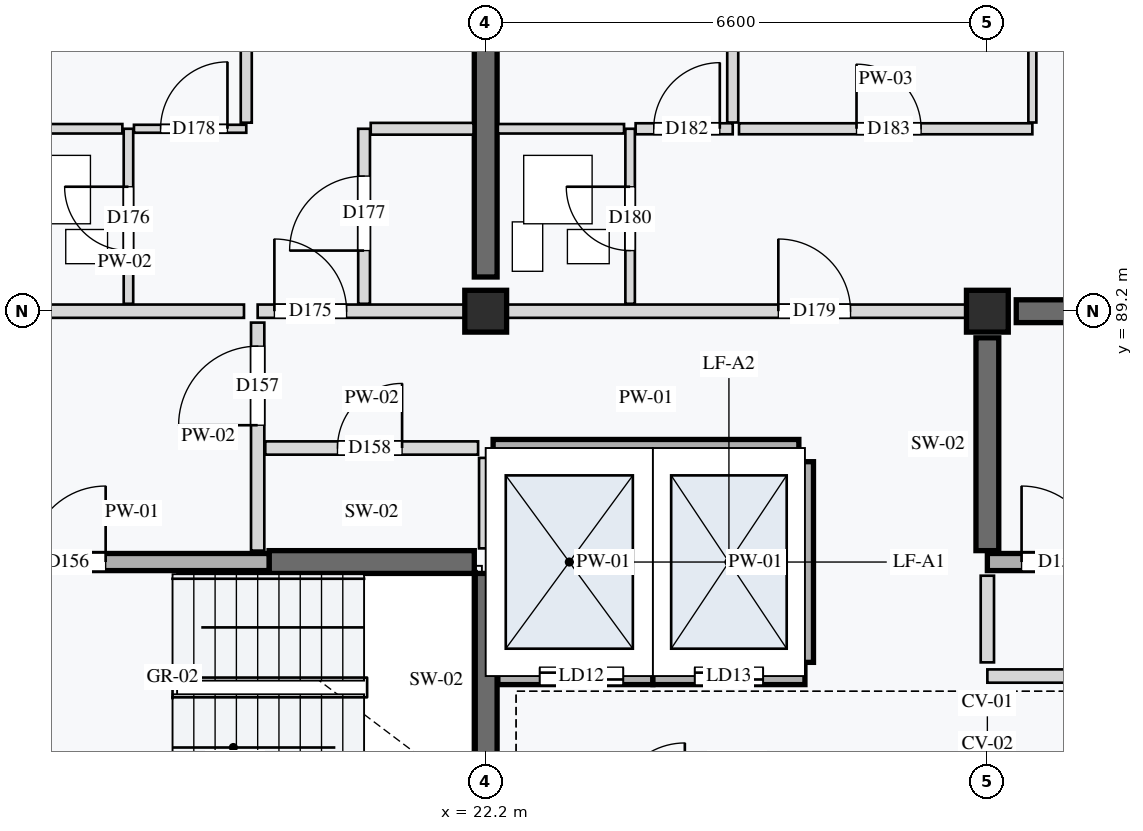
"""IFC4 building model, lengths in metres.
Left out: names, types, materials, properties, quantities, classifications, styles, units other than length and angle.
Written with IfcOpenShell. Run it as: python <this file> out.ifc"""

import sys

from ifc_helpers import new_model, si_unit, direction, frame, frame_2d, origin, origin_2d, place, context, subcontext, project, spatial, rectangle, extrude, element, fill, save


model = new_model("IFC4")
c1 = context("Model", 3, precision=1e-05, world=origin(), true_north=direction((0.0, 1.0)))
c2 = subcontext(c1, "Body", "Model", "MODEL_VIEW")
j1 = project(units=[si_unit("LENGTHUNIT", "METRE"), si_unit("PLANEANGLEUNIT", "RADIAN")], contexts=[c1])
p1 = place(None, origin())
s1 = spatial("IfcSite", under=j1, at=p1, CompositionType="ELEMENT")
p2 = place(p1, origin())
s2 = spatial("IfcBuilding", under=s1, at=p2, CompositionType="ELEMENT")
p3 = place(p2, frame((0.0, 0.0, 18.0)))
s3 = spatial("IfcBuildingStorey", under=s2, at=p3, CompositionType="ELEMENT", Elevation=18.0)
for number, where, z_axis, x_axis in (
    (1, (22.2, 89.2, 0.0), (0.0, 0.0, 1.0), (1.0, 0.0, 0.0)),
    (2, (28.8, 89.2, 0.0), (0.0, 0.0, 1.0), (1.0, 0.0, 0.0)),
):
    element("IfcColumn", number, at=place(p3, frame(where, z_axis=z_axis, x_axis=x_axis)), inside=s3, PredefinedType="COLUMN", context=c2, shape_type="SweptSolid", body=[
        extrude(rectangle(XDim=0.55, YDim=0.55, at=origin_2d()), origin(), (0.0, 0.0, 1.0), 3.2),
    ])
p4 = place(p3, frame((19.35, 85.9, 0.0), z_axis=(0.0, 0.0, 1.0), x_axis=(1.0, 0.0, 0.0)))
e3 = element("IfcWall", 3, at=p4, inside=s3, PredefinedType="SHEAR", context=c2, shape_type="SweptSolid", body=[
    extrude(rectangle(XDim=2.7, YDim=0.3, at=frame_2d((1.35, 0.0))), origin(), (0.0, 0.0, 1.0), 2.96),
])
p5 = place(p3, frame((22.2, 82.95, 0.0), z_axis=(0.0, 0.0, 1.0), x_axis=(0.0, 1.0, 0.0)))
e4 = element("IfcWall", 4, at=p5, inside=s3, PredefinedType="SHEAR", context=c2, shape_type="SweptSolid", body=[
    extrude(rectangle(XDim=2.8, YDim=0.3, at=frame_2d((1.4, 0.0))), origin(), (0.0, 0.0, 1.0), 2.96),
])
p6 = place(p3, frame((29.18, 89.2, 0.0), z_axis=(0.0, 0.0, 1.0), x_axis=(1.0, 0.0, 0.0)))
e5 = element("IfcWall", 5, at=p6, inside=s3, PredefinedType="SHEAR", context=c2, shape_type="SweptSolid", body=[
    extrude(rectangle(XDim=5.84, YDim=0.3, at=frame_2d((2.92, 0.0))), origin(), (0.0, 0.0, 1.0), 2.96),
])
p7 = place(p3, frame((28.8, 86.05, 0.0), z_axis=(0.0, 0.0, 1.0), x_axis=(0.0, 1.0, 0.0)))
e6 = element("IfcWall", 6, at=p7, inside=s3, PredefinedType="SHEAR", context=c2, shape_type="SweptSolid", body=[
    extrude(rectangle(XDim=2.8, YDim=0.3, at=frame_2d((1.4, 0.0))), origin(), (0.0, 0.0, 1.0), 2.96),
])
p8 = place(p3, frame((22.2, 89.65, 0.0), z_axis=(0.0, 0.0, 1.0), x_axis=(0.0, 1.0, 0.0)))
e7 = element("IfcWall", 7, at=p8, inside=s3, PredefinedType="SHEAR", context=c2, shape_type="SweptSolid", body=[
    extrude(rectangle(XDim=5.7, YDim=0.3, at=frame_2d((2.85, 0.0))), origin(), (0.0, 0.0, 1.0), 2.96),
])
p9 = place(p3, frame((15.75, 85.9, 0.0), z_axis=(0.0, 0.0, 1.0), x_axis=(1.0, 0.0, 0.0)))
e8 = element("IfcWall", 8, at=p9, inside=s3, PredefinedType="STANDARD", context=c2, shape_type="SweptSolid", body=[
    extrude(rectangle(XDim=3.6, YDim=0.225, at=frame_2d((1.8, 0.0))), origin(), (0.0, 0.0, 1.0), 2.96),
])
p10 = place(p9, frame((0.45, 0.0, 0.0)))
e9 = element("IfcOpeningElement", 9, at=p10, cuts=e8, PredefinedType="OPENING", context=c2, shape_type="SweptSolid", body=[
    extrude(rectangle(XDim=1.0, YDim=2.16, at=frame_2d((0.5, 1.08))), frame((0.0, 0.123, 0.0), z_axis=(0.0, -1.0, 0.0), x_axis=(1.0, 0.0, 0.0)), (0.0, 0.0, 1.0), 0.245),
])
p11 = place(p3, frame((19.2, 86.05, 0.0), z_axis=(0.0, 0.0, 1.0), x_axis=(0.0, 1.0, 0.0)))
e10 = element("IfcWall", 10, at=p11, inside=s3, PredefinedType="PARTITIONING", context=c2, shape_type="SweptSolid", body=[
    extrude(rectangle(XDim=3.0, YDim=0.175, at=frame_2d((1.5, 0.0))), origin(), (0.0, 0.0, 1.0), 2.96),
])
p12 = place(p11, frame((1.65, 0.0, 0.0)))
e11 = element("IfcOpeningElement", 11, at=p12, cuts=e10, PredefinedType="OPENING", context=c2, shape_type="SweptSolid", body=[
    extrude(rectangle(XDim=1.04, YDim=2.12, at=frame_2d((0.52, 1.06))), frame((0.0, 0.097, 0.0), z_axis=(0.0, -1.0, 0.0), x_axis=(1.0, 0.0, 0.0)), (0.0, 0.0, 1.0), 0.195),
])
p13 = place(p3, frame((19.3, 87.4, 0.0), z_axis=(0.0, 0.0, 1.0), x_axis=(1.0, 0.0, 0.0)))
e12 = element("IfcWall", 12, at=p13, inside=s3, PredefinedType="PARTITIONING", context=c2, shape_type="SweptSolid", body=[
    extrude(rectangle(XDim=2.8, YDim=0.175, at=frame_2d((1.4, 0.0))), origin(), (0.0, 0.0, 1.0), 2.96),
])
p14 = place(p13, frame((0.95, 0.0, 0.0)))
e13 = element("IfcOpeningElement", 13, at=p14, cuts=e12, PredefinedType="OPENING", context=c2, shape_type="SweptSolid", body=[
    extrude(rectangle(XDim=0.85, YDim=2.0, at=frame_2d((0.425, 1.0))), frame((0.0, 0.097, 0.0), z_axis=(0.0, -1.0, 0.0), x_axis=(1.0, 0.0, 0.0)), (0.0, 0.0, 1.0), 0.195),
])
p15 = place(p3, frame((22.2, 86.08, 0.0), z_axis=(0.0, 0.0, 1.0), x_axis=(0.0, 1.0, 0.0)))
e14 = element("IfcWall", 14, at=p15, inside=s3, PredefinedType="PARTITIONING", context=c2, shape_type="SweptSolid", body=[
    extrude(rectangle(XDim=1.19, YDim=0.175, at=frame_2d((0.595, 0.0))), origin(), (0.0, 0.0, 1.0), 2.96),
])
p16 = place(p3, frame((22.36, 84.4, 0.0), z_axis=(0.0, 0.0, 1.0), x_axis=(1.0, 0.0, 0.0)))
e15 = element("IfcWall", 15, at=p16, inside=s3, PredefinedType="STANDARD", context=c2, shape_type="SweptSolid", body=[
    extrude(rectangle(XDim=2.04, YDim=0.225, at=frame_2d((1.02, 0.0))), origin(), (0.0, 0.0, 1.0), 2.96),
])
p17 = place(p16, frame((0.55, 0.0, 0.0)))
e16 = element("IfcOpeningElement", 16, at=p17, cuts=e15, PredefinedType="OPENING", context=c2, shape_type="SweptSolid", body=[
    extrude(rectangle(XDim=1.1, YDim=2.1, at=frame_2d((0.55, 1.05))), frame((0.0, 0.123, 0.0), z_axis=(0.0, -1.0, 0.0), x_axis=(1.0, 0.0, 0.0)), (0.0, 0.0, 1.0), 0.245),
])
p18 = place(p3, frame((24.4, 84.4, 0.0), z_axis=(0.0, 0.0, 1.0), x_axis=(1.0, 0.0, 0.0)))
e17 = element("IfcWall", 17, at=p18, inside=s3, PredefinedType="STANDARD", context=c2, shape_type="SweptSolid", body=[
    extrude(rectangle(XDim=2.0, YDim=0.225, at=frame_2d((1.0, 0.0))), origin(), (0.0, 0.0, 1.0), 2.96),
])
p19 = place(p18, frame((0.55, 0.0, 0.0)))
e18 = element("IfcOpeningElement", 18, at=p19, cuts=e17, PredefinedType="OPENING", context=c2, shape_type="SweptSolid", body=[
    extrude(rectangle(XDim=0.9, YDim=2.1, at=frame_2d((0.45, 1.05))), frame((0.0, 0.123, 0.0), z_axis=(0.0, -1.0, 0.0), x_axis=(1.0, 0.0, 0.0)), (0.0, 0.0, 1.0), 0.245),
])
p20 = place(p3, frame((22.298, 87.4, 0.0), z_axis=(0.0, 0.0, 1.0), x_axis=(1.0, 0.0, 0.0)))
e19 = element("IfcWall", 19, at=p20, inside=s3, PredefinedType="STANDARD", context=c2, shape_type="SweptSolid", body=[
    extrude(rectangle(XDim=4.022, YDim=0.225, at=frame_2d((2.011, 0.0))), origin(), (0.0, 0.0, 1.0), 2.96),
])
for number, where, z_axis, x_axis in (
    (20, (24.4, 84.58, 0.0), (0.0, 0.0, 1.0), (0.0, 1.0, 0.0)),
    (21, (26.4, 84.58, 0.0), (0.0, 0.0, 1.0), (0.0, 1.0, 0.0)),
):
    element("IfcWall", number, at=place(p3, frame(where, z_axis=z_axis, x_axis=x_axis)), inside=s3, PredefinedType="STANDARD", context=c2, shape_type="SweptSolid", body=[
        extrude(rectangle(XDim=2.64, YDim=0.225, at=frame_2d((1.32, 0.0))), origin(), (0.0, 0.0, 1.0), 2.96),
    ])
p21 = place(p3, frame((28.8, 85.9, 0.0), z_axis=(0.0, 0.0, 1.0), x_axis=(1.0, 0.0, 0.0)))
e22 = element("IfcWall", 22, at=p21, inside=s3, PredefinedType="STANDARD", context=c2, shape_type="SweptSolid", body=[
    extrude(rectangle(XDim=3.45, YDim=0.225, at=frame_2d((1.725, 0.0))), origin(), (0.0, 0.0, 1.0), 2.96),
])
p22 = place(p21, frame((0.45, 0.0, 0.0)))
e23 = element("IfcOpeningElement", 23, at=p22, cuts=e22, PredefinedType="OPENING", context=c2, shape_type="SweptSolid", body=[
    extrude(rectangle(XDim=1.0, YDim=2.1, at=frame_2d((0.5, 1.05))), frame((0.0, 0.123, 0.0), z_axis=(0.0, -1.0, 0.0), x_axis=(1.0, 0.0, 0.0)), (0.0, 0.0, 1.0), 0.245),
])
p23 = place(p3, frame((28.8, 84.4, 0.0), z_axis=(0.0, 0.0, 1.0), x_axis=(1.0, 0.0, 0.0)))
e24 = element("IfcWall", 24, at=p23, inside=s3, PredefinedType="PARTITIONING", context=c2, shape_type="SweptSolid", body=[
    extrude(rectangle(XDim=3.3, YDim=0.175, at=frame_2d((1.65, 0.0))), origin(), (0.0, 0.0, 1.0), 2.96),
])
p24 = place(p23, frame((1.8, 0.0, 0.0)))
e25 = element("IfcOpeningElement", 25, at=p24, cuts=e24, PredefinedType="OPENING", context=c2, shape_type="SweptSolid", body=[
    extrude(rectangle(XDim=1.0, YDim=2.16, at=frame_2d((0.5, 1.08))), frame((0.0, 0.097, 0.0), z_axis=(0.0, -1.0, 0.0), x_axis=(1.0, 0.0, 0.0)), (0.0, 0.0, 1.0), 0.195),
])
p25 = place(p3, frame((28.8, 84.58, 0.0), z_axis=(0.0, 0.0, 1.0), x_axis=(0.0, 1.0, 0.0)))
e26 = element("IfcWall", 26, at=p25, inside=s3, PredefinedType="PARTITIONING", context=c2, shape_type="SweptSolid", body=[
    extrude(rectangle(XDim=1.14, YDim=0.175, at=frame_2d((0.57, 0.0))), origin(), (0.0, 0.0, 1.0), 2.96),
])
p26 = place(p3, frame((15.88, 89.2, 0.0), z_axis=(0.0, 0.0, 1.0), x_axis=(1.0, 0.0, 0.0)))
e27 = element("IfcWall", 27, at=p26, inside=s3, PredefinedType="PARTITIONING", context=c2, shape_type="SweptSolid", body=[
    extrude(rectangle(XDim=3.14, YDim=0.175, at=frame_2d((1.57, 0.0))), origin(), (0.0, 0.0, 1.0), 2.55),
])
p27 = place(p3, frame((19.2, 89.2, 0.0), z_axis=(0.0, 0.0, 1.0), x_axis=(1.0, 0.0, 0.0)))
e28 = element("IfcWall", 28, at=p27, inside=s3, PredefinedType="PARTITIONING", context=c2, shape_type="SweptSolid", body=[
    extrude(rectangle(XDim=3.0, YDim=0.175, at=frame_2d((1.5, 0.0))), origin(), (0.0, 0.0, 1.0), 2.55),
])
p28 = place(p27, frame((0.22, 0.0, 0.0)))
e29 = element("IfcOpeningElement", 29, at=p28, cuts=e28, PredefinedType="OPENING", context=c2, shape_type="SweptSolid", body=[
    extrude(rectangle(XDim=0.95, YDim=2.16, at=frame_2d((0.475, 1.08))), frame((0.0, 0.097, 0.0), z_axis=(0.0, -1.0, 0.0), x_axis=(1.0, 0.0, 0.0)), (0.0, 0.0, 1.0), 0.195),
])
p29 = place(p3, frame((17.5, 89.298, 0.0), z_axis=(0.0, 0.0, 1.0), x_axis=(0.0, 1.0, 0.0)))
e30 = element("IfcWall", 30, at=p29, inside=s3, PredefinedType="PARTITIONING", context=c2, shape_type="SweptSolid", body=[
    extrude(rectangle(XDim=2.302, YDim=0.125, at=frame_2d((1.151, 0.0))), origin(), (0.0, 0.0, 1.0), 2.96),
])
p30 = place(p29, frame((0.7, 0.0, 0.0)))
e31 = element("IfcOpeningElement", 31, at=p30, cuts=e30, PredefinedType="OPENING", context=c2, shape_type="SweptSolid", body=[
    extrude(rectangle(XDim=0.84, YDim=2.06, at=frame_2d((0.42, 1.03))), frame((0.0, 0.073, 0.0), z_axis=(0.0, -1.0, 0.0), x_axis=(1.0, 0.0, 0.0)), (0.0, 0.0, 1.0), 0.145),
])
p31 = place(p3, frame((15.77, 91.6, 0.0), z_axis=(0.0, 0.0, 1.0), x_axis=(1.0, 0.0, 0.0)))
e32 = element("IfcWall", 32, at=p31, inside=s3, PredefinedType="PARTITIONING", context=c2, shape_type="SweptSolid", body=[
    extrude(rectangle(XDim=1.65, YDim=0.125, at=frame_2d((0.825, 0.0))), origin(), (0.0, 0.0, 1.0), 2.96),
])
p32 = place(p3, frame((20.6, 89.298, 0.0), z_axis=(0.0, 0.0, 1.0), x_axis=(0.0, 1.0, 0.0)))
e33 = element("IfcWall", 33, at=p32, inside=s3, PredefinedType="PARTITIONING", context=c2, shape_type="SweptSolid", body=[
    extrude(rectangle(XDim=2.302, YDim=0.155, at=frame_2d((1.151, 0.0))), origin(), (0.0, 0.0, 1.0), 2.96),
])
p33 = place(p32, frame((0.7, 0.0, 0.0)))
e34 = element("IfcOpeningElement", 34, at=p33, cuts=e33, PredefinedType="OPENING", context=c2, shape_type="SweptSolid", body=[
    extrude(rectangle(XDim=0.98, YDim=2.12, at=frame_2d((0.49, 1.06))), frame((0.0, 0.087, 0.0), z_axis=(0.0, -1.0, 0.0), x_axis=(1.0, 0.0, 0.0)), (0.0, 0.0, 1.0), 0.175),
])
p34 = place(p3, frame((20.688, 91.6, 0.0), z_axis=(0.0, 0.0, 1.0), x_axis=(1.0, 0.0, 0.0)))
e35 = element("IfcWall", 35, at=p34, inside=s3, PredefinedType="PARTITIONING", context=c2, shape_type="SweptSolid", body=[
    extrude(rectangle(XDim=1.353, YDim=0.155, at=frame_2d((0.676, 0.0))), origin(), (0.0, 0.0, 1.0), 2.96),
])
p35 = place(p3, frame((17.573, 91.6, 0.0), z_axis=(0.0, 0.0, 1.0), x_axis=(1.0, 0.0, 0.0)))
e36 = element("IfcWall", 36, at=p35, inside=s3, PredefinedType="PARTITIONING", context=c2, shape_type="SweptSolid", body=[
    extrude(rectangle(XDim=1.478, YDim=0.105, at=frame_2d((0.739, 0.0))), origin(), (0.0, 0.0, 1.0), 2.96),
])
p36 = place(p35, frame((0.35, 0.0, 0.0)))
e37 = element("IfcOpeningElement", 37, at=p36, cuts=e36, PredefinedType="OPENING", context=c2, shape_type="SweptSolid", body=[
    extrude(rectangle(XDim=0.88, YDim=2.1, at=frame_2d((0.44, 1.05))), frame((0.0, 0.062, 0.0), z_axis=(0.0, -1.0, 0.0), x_axis=(1.0, 0.0, 0.0)), (0.0, 0.0, 1.0), 0.125),
])
p37 = place(p3, frame((19.05, 91.68, 0.0), z_axis=(0.0, 0.0, 1.0), x_axis=(0.0, 1.0, 0.0)))
e38 = element("IfcWall", 38, at=p37, inside=s3, PredefinedType="PARTITIONING", context=c2, shape_type="SweptSolid", body=[
    extrude(rectangle(XDim=3.95, YDim=0.145, at=frame_2d((1.975, 0.0))), origin(), (0.0, 0.0, 1.0), 2.96),
])
p38 = place(p3, frame((22.2, 89.2, 0.0), z_axis=(0.0, 0.0, 1.0), x_axis=(1.0, 0.0, 0.0)))
e39 = element("IfcWall", 39, at=p38, inside=s3, PredefinedType="PARTITIONING", context=c2, shape_type="SweptSolid", body=[
    extrude(rectangle(XDim=6.6, YDim=0.175, at=frame_2d((3.3, 0.0))), origin(), (0.0, 0.0, 1.0), 2.55),
])
p39 = place(p38, frame((3.85, 0.0, 0.0)))
e40 = element("IfcOpeningElement", 40, at=p39, cuts=e39, PredefinedType="OPENING", context=c2, shape_type="SweptSolid", body=[
    extrude(rectangle(XDim=0.95, YDim=2.16, at=frame_2d((0.475, 1.08))), frame((0.0, 0.097, 0.0), z_axis=(0.0, -1.0, 0.0), x_axis=(1.0, 0.0, 0.0)), (0.0, 0.0, 1.0), 0.195),
])
p40 = place(p3, frame((24.1, 89.298, 0.0), z_axis=(0.0, 0.0, 1.0), x_axis=(0.0, 1.0, 0.0)))
e41 = element("IfcWall", 41, at=p40, inside=s3, PredefinedType="PARTITIONING", context=c2, shape_type="SweptSolid", body=[
    extrude(rectangle(XDim=2.302, YDim=0.125, at=frame_2d((1.151, 0.0))), origin(), (0.0, 0.0, 1.0), 2.96),
])
p41 = place(p40, frame((0.7, 0.0, 0.0)))
e42 = element("IfcOpeningElement", 42, at=p41, cuts=e41, PredefinedType="OPENING", context=c2, shape_type="SweptSolid", body=[
    extrude(rectangle(XDim=0.84, YDim=2.06, at=frame_2d((0.42, 1.03))), frame((0.0, 0.073, 0.0), z_axis=(0.0, -1.0, 0.0), x_axis=(1.0, 0.0, 0.0)), (0.0, 0.0, 1.0), 0.145),
])
p42 = place(p3, frame((22.36, 91.6, 0.0), z_axis=(0.0, 0.0, 1.0), x_axis=(1.0, 0.0, 0.0)))
e43 = element("IfcWall", 43, at=p42, inside=s3, PredefinedType="PARTITIONING", context=c2, shape_type="SweptSolid", body=[
    extrude(rectangle(XDim=1.66, YDim=0.125, at=frame_2d((0.83, 0.0))), origin(), (0.0, 0.0, 1.0), 2.96),
])
p43 = place(p3, frame((24.173, 91.6, 0.0), z_axis=(0.0, 0.0, 1.0), x_axis=(1.0, 0.0, 0.0)))
e44 = element("IfcWall", 44, at=p43, inside=s3, PredefinedType="PARTITIONING", context=c2, shape_type="SweptSolid", body=[
    extrude(rectangle(XDim=1.277, YDim=0.145, at=frame_2d((0.639, 0.0))), origin(), (0.0, 0.0, 1.0), 2.96),
])
p44 = place(p43, frame((0.238, 0.0, 0.0)))
e45 = element("IfcOpeningElement", 45, at=p44, cuts=e44, PredefinedType="OPENING", context=c2, shape_type="SweptSolid", body=[
    extrude(rectangle(XDim=0.87, YDim=2.08, at=frame_2d((0.435, 1.04))), frame((0.0, 0.083, 0.0), z_axis=(0.0, -1.0, 0.0), x_axis=(1.0, 0.0, 0.0)), (0.0, 0.0, 1.0), 0.165),
])
p45 = place(p3, frame((25.45, 91.683, 0.0), z_axis=(0.0, 0.0, 1.0), x_axis=(0.0, 1.0, 0.0)))
e46 = element("IfcWall", 46, at=p45, inside=s3, PredefinedType="PARTITIONING", context=c2, shape_type="SweptSolid", body=[
    extrude(rectangle(XDim=3.947, YDim=0.145, at=frame_2d((1.974, 0.0))), origin(), (0.0, 0.0, 1.0), 2.96),
])
p46 = place(p3, frame((25.532, 91.6, 0.0), z_axis=(0.0, 0.0, 1.0), x_axis=(1.0, 0.0, 0.0)))
e47 = element("IfcWall", 47, at=p46, inside=s3, PredefinedType="PARTITIONING", context=c2, shape_type="SweptSolid", body=[
    extrude(rectangle(XDim=3.86, YDim=0.145, at=frame_2d((1.93, 0.0))), origin(), (0.0, 0.0, 1.0), 2.96),
])
p47 = place(p46, frame((1.546, 0.0, 0.0)))
e48 = element("IfcOpeningElement", 48, at=p47, cuts=e47, PredefinedType="OPENING", context=c2, shape_type="SweptSolid", body=[
    extrude(rectangle(XDim=0.85, YDim=2.1, at=frame_2d((0.425, 1.05))), frame((0.0, 0.083, 0.0), z_axis=(0.0, -1.0, 0.0), x_axis=(1.0, 0.0, 0.0)), (0.0, 0.0, 1.0), 0.165),
])
p48 = place(p3, frame((29.392, 91.683, 0.0), z_axis=(0.0, 0.0, 1.0), x_axis=(0.0, 1.0, 0.0)))
e49 = element("IfcWall", 49, at=p48, inside=s3, PredefinedType="PARTITIONING", context=c2, shape_type="SweptSolid", body=[
    extrude(rectangle(XDim=3.947, YDim=0.105, at=frame_2d((1.974, 0.0))), origin(), (0.0, 0.0, 1.0), 2.96),
])
p49 = place(p10, origin())
e50 = element("IfcDoor", 50, at=p49, inside=s3, OperationType="SINGLE_SWING_RIGHT", PredefinedType="DOOR", context=c2, shape_type="SweptSolid", body=[
    extrude(rectangle(XDim=1.0, YDim=2.16, at=frame_2d((0.5, 1.08))), frame((0.0, 0.025, 0.0), z_axis=(0.0, -1.0, 0.0), x_axis=(1.0, 0.0, 0.0)), (0.0, 0.0, 1.0), 0.05),
])
fill(e9, e50)
p50 = place(p12, origin())
e51 = element("IfcDoor", 51, at=p50, inside=s3, OperationType="SINGLE_SWING_LEFT", PredefinedType="DOOR", context=c2, shape_type="SweptSolid", body=[
    extrude(rectangle(XDim=1.04, YDim=2.12, at=frame_2d((0.52, 1.06))), frame((0.0, 0.025, 0.0), z_axis=(0.0, -1.0, 0.0), x_axis=(1.0, 0.0, 0.0)), (0.0, 0.0, 1.0), 0.05),
])
fill(e11, e51)
p51 = place(p14, origin())
e52 = element("IfcDoor", 52, at=p51, inside=s3, OperationType="SINGLE_SWING_RIGHT", PredefinedType="DOOR", context=c2, shape_type="SweptSolid", body=[
    extrude(rectangle(XDim=0.85, YDim=2.0, at=frame_2d((0.425, 1.0))), frame((0.0, 0.025, 0.0), z_axis=(0.0, -1.0, 0.0), x_axis=(1.0, 0.0, 0.0)), (0.0, 0.0, 1.0), 0.05),
])
fill(e13, e52)
p52 = place(p17, origin())
e53 = element("IfcDoor", 53, at=p52, inside=s3, OperationType="DOUBLE_DOOR_SLIDING", PredefinedType="DOOR", context=c2, shape_type="SweptSolid", body=[
    extrude(rectangle(XDim=1.1, YDim=2.1, at=frame_2d((0.55, 1.05))), frame((0.0, 0.025, 0.0), z_axis=(0.0, -1.0, 0.0), x_axis=(1.0, 0.0, 0.0)), (0.0, 0.0, 1.0), 0.05),
])
fill(e16, e53)
p53 = place(p19, origin())
e54 = element("IfcDoor", 54, at=p53, inside=s3, OperationType="DOUBLE_DOOR_SLIDING", PredefinedType="DOOR", context=c2, shape_type="SweptSolid", body=[
    extrude(rectangle(XDim=0.9, YDim=2.1, at=frame_2d((0.45, 1.05))), frame((0.0, 0.025, 0.0), z_axis=(0.0, -1.0, 0.0), x_axis=(1.0, 0.0, 0.0)), (0.0, 0.0, 1.0), 0.05),
])
fill(e18, e54)
p54 = place(p22, origin())
e55 = element("IfcDoor", 55, at=p54, inside=s3, OperationType="SINGLE_SWING_LEFT", PredefinedType="DOOR", context=c2, shape_type="SweptSolid", body=[
    extrude(rectangle(XDim=1.0, YDim=2.1, at=frame_2d((0.5, 1.05))), frame((0.0, 0.025, 0.0), z_axis=(0.0, -1.0, 0.0), x_axis=(1.0, 0.0, 0.0)), (0.0, 0.0, 1.0), 0.05),
])
fill(e23, e55)
p55 = place(p28, origin())
e56 = element("IfcDoor", 56, at=p55, inside=s3, OperationType="SINGLE_SWING_LEFT", PredefinedType="DOOR", context=c2, shape_type="SweptSolid", body=[
    extrude(rectangle(XDim=0.95, YDim=2.16, at=frame_2d((0.475, 1.08))), frame((0.0, 0.025, 0.0), z_axis=(0.0, -1.0, 0.0), x_axis=(1.0, 0.0, 0.0)), (0.0, 0.0, 1.0), 0.05),
])
fill(e29, e56)
p56 = place(p30, origin())
e57 = element("IfcDoor", 57, at=p56, inside=s3, OperationType="SINGLE_SWING_RIGHT", PredefinedType="DOOR", context=c2, shape_type="SweptSolid", body=[
    extrude(rectangle(XDim=0.84, YDim=2.06, at=frame_2d((0.42, 1.03))), frame((0.0, 0.025, 0.0), z_axis=(0.0, -1.0, 0.0), x_axis=(1.0, 0.0, 0.0)), (0.0, 0.0, 1.0), 0.05),
])
fill(e31, e57)
p57 = place(p33, origin())
e58 = element("IfcDoor", 58, at=p57, inside=s3, OperationType="SINGLE_SWING_LEFT", PredefinedType="DOOR", context=c2, shape_type="SweptSolid", body=[
    extrude(rectangle(XDim=0.98, YDim=2.12, at=frame_2d((0.49, 1.06))), frame((0.0, 0.025, 0.0), z_axis=(0.0, -1.0, 0.0), x_axis=(1.0, 0.0, 0.0)), (0.0, 0.0, 1.0), 0.05),
])
fill(e34, e58)
p58 = place(p36, origin())
e59 = element("IfcDoor", 59, at=p58, inside=s3, OperationType="SINGLE_SWING_RIGHT", PredefinedType="DOOR", context=c2, shape_type="SweptSolid", body=[
    extrude(rectangle(XDim=0.88, YDim=2.1, at=frame_2d((0.44, 1.05))), frame((0.0, 0.025, 0.0), z_axis=(0.0, -1.0, 0.0), x_axis=(1.0, 0.0, 0.0)), (0.0, 0.0, 1.0), 0.05),
])
fill(e37, e59)
p59 = place(p39, origin())
e60 = element("IfcDoor", 60, at=p59, inside=s3, OperationType="SINGLE_SWING_LEFT", PredefinedType="DOOR", context=c2, shape_type="SweptSolid", body=[
    extrude(rectangle(XDim=0.95, YDim=2.16, at=frame_2d((0.475, 1.08))), frame((0.0, 0.025, 0.0), z_axis=(0.0, -1.0, 0.0), x_axis=(1.0, 0.0, 0.0)), (0.0, 0.0, 1.0), 0.05),
])
fill(e40, e60)
p60 = place(p41, origin())
e61 = element("IfcDoor", 61, at=p60, inside=s3, OperationType="SINGLE_SWING_RIGHT", PredefinedType="DOOR", context=c2, shape_type="SweptSolid", body=[
    extrude(rectangle(XDim=0.84, YDim=2.06, at=frame_2d((0.42, 1.03))), frame((0.0, 0.025, 0.0), z_axis=(0.0, -1.0, 0.0), x_axis=(1.0, 0.0, 0.0)), (0.0, 0.0, 1.0), 0.05),
])
fill(e42, e61)
p61 = place(p44, origin())
e62 = element("IfcDoor", 62, at=p61, inside=s3, OperationType="SINGLE_SWING_RIGHT", PredefinedType="DOOR", context=c2, shape_type="SweptSolid", body=[
    extrude(rectangle(XDim=0.87, YDim=2.08, at=frame_2d((0.435, 1.04))), frame((0.0, 0.025, 0.0), z_axis=(0.0, -1.0, 0.0), x_axis=(1.0, 0.0, 0.0)), (0.0, 0.0, 1.0), 0.05),
])
fill(e45, e62)
p62 = place(p47, origin())
e63 = element("IfcDoor", 63, at=p62, inside=s3, OperationType="SINGLE_SWING_LEFT", PredefinedType="DOOR", context=c2, shape_type="SweptSolid", body=[
    extrude(rectangle(XDim=0.85, YDim=2.1, at=frame_2d((0.425, 1.05))), frame((0.0, 0.025, 0.0), z_axis=(0.0, -1.0, 0.0), x_axis=(1.0, 0.0, 0.0)), (0.0, 0.0, 1.0), 0.05),
])
fill(e48, e63)
save(model, sys.argv[1])
